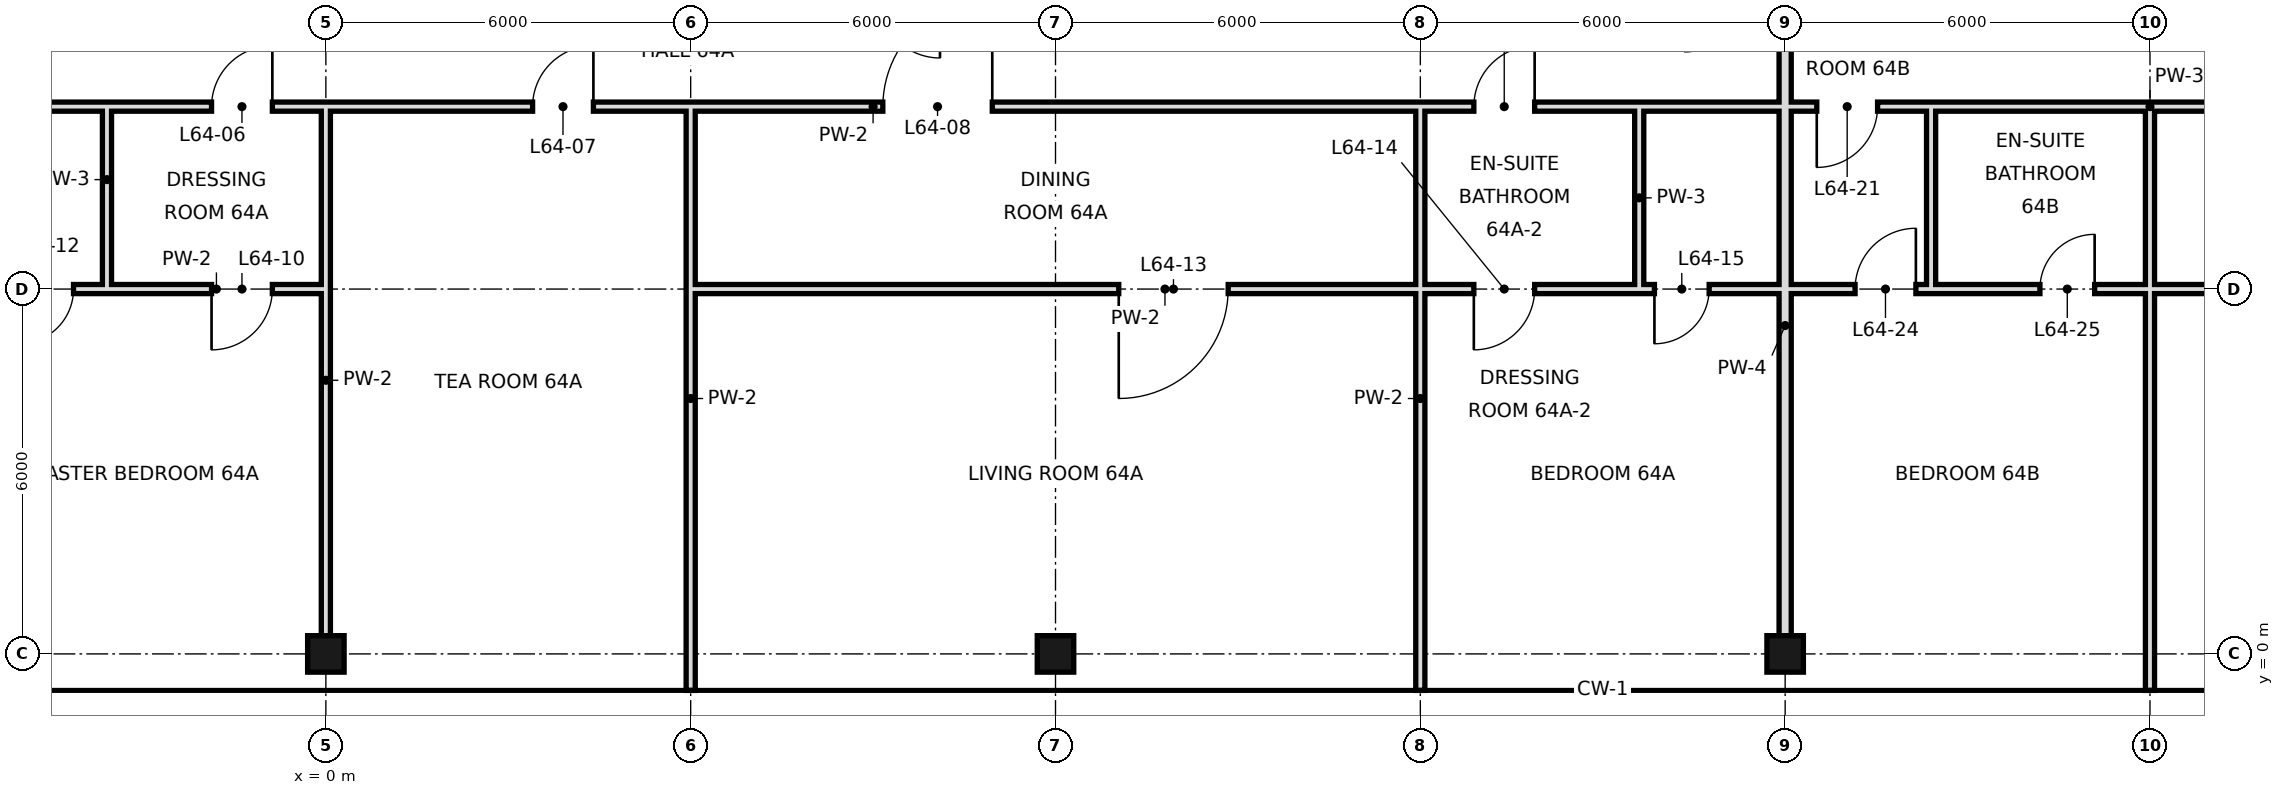
"""IFC4 building model, lengths in metres.
Left out: names, types, materials, properties, quantities, classifications, styles, units other than length and angle.
Written with IfcOpenShell. Run it as: python <this file> out.ifc"""

import sys

from ifc_helpers import new_model, si_unit, direction, frame, frame_2d, origin, origin_2d, place, context, subcontext, project, spatial, rectangle, hollow_rectangle, extrude, element, fill, save


model = new_model("IFC4")
c1 = context("Model", 3, precision=1e-05, world=origin(), true_north=direction((0.0, 1.0)))
c2 = subcontext(c1, "Body", "Model", "MODEL_VIEW")
j1 = project(units=[si_unit("LENGTHUNIT", "METRE"), si_unit("PLANEANGLEUNIT", "RADIAN")], contexts=[c1])
p1 = place(None, origin())
s1 = spatial("IfcSite", under=j1, at=p1, CompositionType="ELEMENT")
p2 = place(p1, origin())
s2 = spatial("IfcBuilding", under=s1, at=p2, CompositionType="ELEMENT")
p3 = place(p2, frame((0.0, 0.0, 270.2)))
s3 = spatial("IfcBuildingStorey", under=s2, at=p3, CompositionType="ELEMENT", Elevation=270.2)
for number, where, z_axis, x_axis in (
    (1, (0.0, 0.0, 0.0), (0.0, 0.0, 1.0), (1.0, 0.0, 0.0)),
    (2, (12.0, 0.0, 0.0), (0.0, 0.0, 1.0), (1.0, 0.0, 0.0)),
    (3, (24.0, 0.0, 0.0), (0.0, 0.0, 1.0), (1.0, 0.0, 0.0)),
):
    element("IfcColumn", number, at=place(p3, frame(where, z_axis=z_axis, x_axis=x_axis)), inside=s3, PredefinedType="COLUMN", context=c2, shape_type="SweptSolid", body=[
        extrude(hollow_rectangle(XDim=0.6, YDim=0.6, WallThickness=0.028, at=origin_2d()), origin(), (0.0, 0.0, 1.0), 3.6),
    ])
p4 = place(p3, frame((-3.6, 6.0, 0.0), z_axis=(0.0, 0.0, 1.0), x_axis=(0.0, 1.0, 0.0)))
e4 = element("IfcWall", 4, at=p4, inside=s3, PredefinedType="PARTITIONING", context=c2, shape_type="SweptSolid", body=[
    extrude(rectangle(XDim=3.0, YDim=0.15, at=frame_2d((1.5, 0.0))), origin(), (0.0, 0.0, 1.0), 3.42),
])
p5 = place(p3, frame((0.0, 0.0, 0.0), z_axis=(0.0, 0.0, 1.0), x_axis=(0.0, 1.0, 0.0)))
e5 = element("IfcWall", 5, at=p5, inside=s3, PredefinedType="PARTITIONING", context=c2, shape_type="SweptSolid", body=[
    extrude(rectangle(XDim=9.0, YDim=0.15, at=frame_2d((4.5, 0.0))), origin(), (0.0, 0.0, 1.0), 2.72),
])
p6 = place(p3, frame((18.0, -0.6, 0.0), z_axis=(0.0, 0.0, 1.0), x_axis=(0.0, 1.0, 0.0)))
e6 = element("IfcWall", 6, at=p6, inside=s3, PredefinedType="PARTITIONING", context=c2, shape_type="SweptSolid", body=[
    extrude(rectangle(XDim=9.6, YDim=0.15, at=frame_2d((4.8, 0.0))), origin(), (0.0, 0.0, 1.0), 2.72),
])
p7 = place(p3, frame((21.6, 6.0, 0.0), z_axis=(0.0, 0.0, 1.0), x_axis=(0.0, 1.0, 0.0)))
e7 = element("IfcWall", 7, at=p7, inside=s3, PredefinedType="PARTITIONING", context=c2, shape_type="SweptSolid", body=[
    extrude(rectangle(XDim=3.0, YDim=0.15, at=frame_2d((1.5, 0.0))), origin(), (0.0, 0.0, 1.0), 3.42),
])
p8 = place(p3, frame((24.0, 0.0, 0.0), z_axis=(0.0, 0.0, 1.0), x_axis=(0.0, 1.0, 0.0)))
e8 = element("IfcWall", 8, at=p8, inside=s3, PredefinedType="SOLIDWALL", context=c2, shape_type="SweptSolid", body=[
    extrude(rectangle(XDim=10.8, YDim=0.2, at=frame_2d((5.4, 0.0))), origin(), (0.0, 0.0, 1.0), 2.72),
])
p9 = place(p3, frame((26.4, 6.0, 0.0), z_axis=(0.0, 0.0, 1.0), x_axis=(0.0, 1.0, 0.0)))
e9 = element("IfcWall", 9, at=p9, inside=s3, PredefinedType="PARTITIONING", context=c2, shape_type="SweptSolid", body=[
    extrude(rectangle(XDim=3.0, YDim=0.15, at=frame_2d((1.5, 0.0))), origin(), (0.0, 0.0, 1.0), 3.42),
])
p10 = place(p3, frame((30.0, -0.6, 0.0), z_axis=(0.0, 0.0, 1.0), x_axis=(0.0, 1.0, 0.0)))
e10 = element("IfcWall", 10, at=p10, inside=s3, PredefinedType="PARTITIONING", context=c2, shape_type="SweptSolid", body=[
    extrude(rectangle(XDim=6.6, YDim=0.15, at=frame_2d((3.3, 0.0))), origin(), (0.0, 0.0, 1.0), 2.72),
])
p11 = place(p3, frame((30.0, 6.0, 0.0), z_axis=(0.0, 0.0, 1.0), x_axis=(0.0, 1.0, 0.0)))
e11 = element("IfcWall", 11, at=p11, inside=s3, PredefinedType="PARTITIONING", context=c2, shape_type="SweptSolid", body=[
    extrude(rectangle(XDim=3.0, YDim=0.15, at=frame_2d((1.5, 0.0))), origin(), (0.0, 0.0, 1.0), 2.72),
])
p12 = place(p3, frame((6.0, -0.6, 0.0), z_axis=(0.0, 0.0, 1.0), x_axis=(0.0, 1.0, 0.0)))
e12 = element("IfcWall", 12, at=p12, inside=s3, PredefinedType="PARTITIONING", context=c2, shape_type="SweptSolid", body=[
    extrude(rectangle(XDim=9.6, YDim=0.15, at=frame_2d((4.8, 0.0))), origin(), (0.0, 0.0, 1.0), 2.72),
])
p13 = place(p3, frame((-3.6, 6.0, 0.0), z_axis=(0.0, 0.0, 1.0), x_axis=(1.0, 0.0, 0.0)))
e13 = element("IfcWall", 13, at=p13, inside=s3, PredefinedType="PARTITIONING", context=c2, shape_type="SweptSolid", body=[
    extrude(rectangle(XDim=3.6, YDim=0.15, at=frame_2d((1.8, 0.0))), origin(), (0.0, 0.0, 1.0), 2.72),
])
p14 = place(p13, frame((1.72, 0.0, 0.0)))
e14 = element("IfcOpeningElement", 14, at=p14, cuts=e13, PredefinedType="OPENING", context=c2, shape_type="SweptSolid", body=[
    extrude(rectangle(XDim=1.0, YDim=2.4, at=frame_2d((0.5, 1.2))), frame((0.0, 0.085, 0.0), z_axis=(0.0, -1.0, 0.0), x_axis=(1.0, 0.0, 0.0)), (0.0, 0.0, 1.0), 0.17),
])
p15 = place(p3, frame((6.0, 6.0, 0.0), z_axis=(0.0, 0.0, 1.0), x_axis=(1.0, 0.0, 0.0)))
e15 = element("IfcWall", 15, at=p15, inside=s3, PredefinedType="PARTITIONING", context=c2, shape_type="SweptSolid", body=[
    extrude(rectangle(XDim=15.6, YDim=0.15, at=frame_2d((7.8, 0.0))), origin(), (0.0, 0.0, 1.0), 2.97),
])
p16 = place(p15, frame((7.04, 0.0, 0.0)))
e16 = element("IfcOpeningElement", 16, at=p16, cuts=e15, PredefinedType="OPENING", context=c2, shape_type="SweptSolid", body=[
    extrude(rectangle(XDim=1.8, YDim=2.4, at=frame_2d((0.9, 1.2))), frame((0.0, 0.085, 0.0), z_axis=(0.0, -1.0, 0.0), x_axis=(1.0, 0.0, 0.0)), (0.0, 0.0, 1.0), 0.17),
])
p17 = place(p15, frame((12.88, 0.0, 0.0)))
e17 = element("IfcOpeningElement", 17, at=p17, cuts=e15, PredefinedType="OPENING", context=c2, shape_type="SweptSolid", body=[
    extrude(rectangle(XDim=1.0, YDim=2.4, at=frame_2d((0.5, 1.2))), frame((0.0, 0.085, 0.0), z_axis=(0.0, -1.0, 0.0), x_axis=(1.0, 0.0, 0.0)), (0.0, 0.0, 1.0), 0.17),
])
p18 = place(p3, frame((24.0, 6.0, 0.0), z_axis=(0.0, 0.0, 1.0), x_axis=(1.0, 0.0, 0.0)))
e18 = element("IfcWall", 18, at=p18, inside=s3, PredefinedType="PARTITIONING", context=c2, shape_type="SweptSolid", body=[
    extrude(rectangle(XDim=2.4, YDim=0.15, at=frame_2d((1.2, 0.0))), origin(), (0.0, 0.0, 1.0), 2.97),
])
p19 = place(p18, frame((1.15, 0.0, 0.0)))
e19 = element("IfcOpeningElement", 19, at=p19, cuts=e18, PredefinedType="OPENING", context=c2, shape_type="SweptSolid", body=[
    extrude(rectangle(XDim=1.0, YDim=2.4, at=frame_2d((0.5, 1.2))), frame((0.0, 0.085, 0.0), z_axis=(0.0, -1.0, 0.0), x_axis=(1.0, 0.0, 0.0)), (0.0, 0.0, 1.0), 0.17),
])
p20 = place(p3, frame((30.0, 6.0, 0.0), z_axis=(0.0, 0.0, 1.0), x_axis=(1.0, 0.0, 0.0)))
e20 = element("IfcWall", 20, at=p20, inside=s3, PredefinedType="PARTITIONING", context=c2, shape_type="SweptSolid", body=[
    extrude(rectangle(XDim=15.6, YDim=0.15, at=frame_2d((7.8, 0.0))), origin(), (0.0, 0.0, 1.0), 2.97),
])
p21 = place(p20, frame((3.16, 0.0, 0.0)))
e21 = element("IfcOpeningElement", 21, at=p21, cuts=e20, PredefinedType="OPENING", context=c2, shape_type="SweptSolid", body=[
    extrude(rectangle(XDim=1.8, YDim=2.4, at=frame_2d((0.9, 1.2))), frame((0.0, 0.085, 0.0), z_axis=(0.0, -1.0, 0.0), x_axis=(1.0, 0.0, 0.0)), (0.0, 0.0, 1.0), 0.17),
])
p22 = place(p20, frame((12.88, 0.0, 0.0)))
e22 = element("IfcOpeningElement", 22, at=p22, cuts=e20, PredefinedType="OPENING", context=c2, shape_type="SweptSolid", body=[
    extrude(rectangle(XDim=1.0, YDim=2.4, at=frame_2d((0.5, 1.2))), frame((0.0, 0.085, 0.0), z_axis=(0.0, -1.0, 0.0), x_axis=(1.0, 0.0, 0.0)), (0.0, 0.0, 1.0), 0.17),
])
p23 = place(p3, frame((-12.0, 6.0, 0.0), z_axis=(0.0, 0.0, 1.0), x_axis=(1.0, 0.0, 0.0)))
e23 = element("IfcWall", 23, at=p23, inside=s3, PredefinedType="PARTITIONING", context=c2, shape_type="SweptSolid", body=[
    extrude(rectangle(XDim=8.4, YDim=0.15, at=frame_2d((4.2, 0.0))), origin(), (0.0, 0.0, 1.0), 2.72),
])
p24 = place(p23, frame((6.95, 0.0, 0.0)))
e24 = element("IfcOpeningElement", 24, at=p24, cuts=e23, PredefinedType="OPENING", context=c2, shape_type="SweptSolid", body=[
    extrude(rectangle(XDim=0.9, YDim=2.4, at=frame_2d((0.45, 1.2))), frame((0.0, 0.085, 0.0), z_axis=(0.0, -1.0, 0.0), x_axis=(1.0, 0.0, 0.0)), (0.0, 0.0, 1.0), 0.17),
])
p25 = place(p3, frame((21.6, 6.0, 0.0), z_axis=(0.0, 0.0, 1.0), x_axis=(1.0, 0.0, 0.0)))
e25 = element("IfcWall", 25, at=p25, inside=s3, PredefinedType="PARTITIONING", context=c2, shape_type="SweptSolid", body=[
    extrude(rectangle(XDim=2.4, YDim=0.15, at=frame_2d((1.2, 0.0))), origin(), (0.0, 0.0, 1.0), 2.97),
])
p26 = place(p25, frame((0.25, 0.0, 0.0)))
e26 = element("IfcOpeningElement", 26, at=p26, cuts=e25, PredefinedType="OPENING", context=c2, shape_type="SweptSolid", body=[
    extrude(rectangle(XDim=0.9, YDim=2.4, at=frame_2d((0.45, 1.2))), frame((0.0, 0.085, 0.0), z_axis=(0.0, -1.0, 0.0), x_axis=(1.0, 0.0, 0.0)), (0.0, 0.0, 1.0), 0.17),
])
p27 = place(p3, frame((26.4, 6.0, 0.0), z_axis=(0.0, 0.0, 1.0), x_axis=(1.0, 0.0, 0.0)))
e27 = element("IfcWall", 27, at=p27, inside=s3, PredefinedType="PARTITIONING", context=c2, shape_type="SweptSolid", body=[
    extrude(rectangle(XDim=3.6, YDim=0.15, at=frame_2d((1.8, 0.0))), origin(), (0.0, 0.0, 1.0), 2.97),
])
p28 = place(p27, frame((1.79, 0.0, 0.0)))
e28 = element("IfcOpeningElement", 28, at=p28, cuts=e27, PredefinedType="OPENING", context=c2, shape_type="SweptSolid", body=[
    extrude(rectangle(XDim=0.9, YDim=2.4, at=frame_2d((0.45, 1.2))), frame((0.0, 0.085, 0.0), z_axis=(0.0, -1.0, 0.0), x_axis=(1.0, 0.0, 0.0)), (0.0, 0.0, 1.0), 0.17),
])
p29 = place(p3, frame((-3.6, 9.0, 0.0), z_axis=(0.0, 0.0, 1.0), x_axis=(1.0, 0.0, 0.0)))
e29 = element("IfcWall", 29, at=p29, inside=s3, PredefinedType="PARTITIONING", context=c2, shape_type="SweptSolid", body=[
    extrude(rectangle(XDim=25.2, YDim=0.15, at=frame_2d((12.6, 0.0))), origin(), (0.0, 0.0, 1.0), 3.42),
])
p30 = place(p29, frame((1.72, 0.0, 0.0)))
e30 = element("IfcOpeningElement", 30, at=p30, cuts=e29, PredefinedType="OPENING", context=c2, shape_type="SweptSolid", body=[
    extrude(rectangle(XDim=1.0, YDim=2.4, at=frame_2d((0.5, 1.2))), frame((0.0, 0.085, 0.0), z_axis=(0.0, -1.0, 0.0), x_axis=(1.0, 0.0, 0.0)), (0.0, 0.0, 1.0), 0.17),
])
p31 = place(p29, frame((7.0, 0.0, 0.0)))
e31 = element("IfcOpeningElement", 31, at=p31, cuts=e29, PredefinedType="OPENING", context=c2, shape_type="SweptSolid", body=[
    extrude(rectangle(XDim=1.0, YDim=2.4, at=frame_2d((0.5, 1.2))), frame((0.0, 0.085, 0.0), z_axis=(0.0, -1.0, 0.0), x_axis=(1.0, 0.0, 0.0)), (0.0, 0.0, 1.0), 0.17),
])
p32 = place(p29, frame((12.76, 0.0, 0.0)))
e32 = element("IfcOpeningElement", 32, at=p32, cuts=e29, PredefinedType="OPENING", context=c2, shape_type="SweptSolid", body=[
    extrude(rectangle(XDim=1.8, YDim=2.4, at=frame_2d((0.9, 1.2))), frame((0.0, 0.085, 0.0), z_axis=(0.0, -1.0, 0.0), x_axis=(1.0, 0.0, 0.0)), (0.0, 0.0, 1.0), 0.17),
])
p33 = place(p29, frame((22.48, 0.0, 0.0)))
e33 = element("IfcOpeningElement", 33, at=p33, cuts=e29, PredefinedType="OPENING", context=c2, shape_type="SweptSolid", body=[
    extrude(rectangle(XDim=1.0, YDim=2.4, at=frame_2d((0.5, 1.2))), frame((0.0, 0.085, 0.0), z_axis=(0.0, -1.0, 0.0), x_axis=(1.0, 0.0, 0.0)), (0.0, 0.0, 1.0), 0.17),
])
p34 = place(p3, frame((24.0, 9.0, 0.0), z_axis=(0.0, 0.0, 1.0), x_axis=(1.0, 0.0, 0.0)))
e34 = element("IfcWall", 34, at=p34, inside=s3, PredefinedType="PARTITIONING", context=c2, shape_type="SweptSolid", body=[
    extrude(rectangle(XDim=2.4, YDim=0.15, at=frame_2d((1.2, 0.0))), origin(), (0.0, 0.0, 1.0), 3.42),
])
p35 = place(p34, frame((0.52, 0.0, 0.0)))
e35 = element("IfcOpeningElement", 35, at=p35, cuts=e34, PredefinedType="OPENING", context=c2, shape_type="SweptSolid", body=[
    extrude(rectangle(XDim=1.0, YDim=2.4, at=frame_2d((0.5, 1.2))), frame((0.0, 0.085, 0.0), z_axis=(0.0, -1.0, 0.0), x_axis=(1.0, 0.0, 0.0)), (0.0, 0.0, 1.0), 0.17),
])
p36 = place(p3, frame((30.0, 9.0, 0.0), z_axis=(0.0, 0.0, 1.0), x_axis=(1.0, 0.0, 0.0)))
e36 = element("IfcWall", 36, at=p36, inside=s3, PredefinedType="PARTITIONING", context=c2, shape_type="SweptSolid", body=[
    extrude(rectangle(XDim=15.6, YDim=0.15, at=frame_2d((7.8, 0.0))), origin(), (0.0, 0.0, 1.0), 3.42),
])
p37 = place(p36, frame((5.1, 0.0, 0.0)))
e37 = element("IfcOpeningElement", 37, at=p37, cuts=e36, PredefinedType="OPENING", context=c2, shape_type="SweptSolid", body=[
    extrude(rectangle(XDim=1.8, YDim=2.4, at=frame_2d((0.9, 1.2))), frame((0.0, 0.085, 0.0), z_axis=(0.0, -1.0, 0.0), x_axis=(1.0, 0.0, 0.0)), (0.0, 0.0, 1.0), 0.17),
])
p38 = place(p36, frame((13.72, 0.0, 0.0)))
e38 = element("IfcOpeningElement", 38, at=p38, cuts=e36, PredefinedType="OPENING", context=c2, shape_type="SweptSolid", body=[
    extrude(rectangle(XDim=1.0, YDim=2.4, at=frame_2d((0.5, 1.2))), frame((0.0, 0.085, 0.0), z_axis=(0.0, -1.0, 0.0), x_axis=(1.0, 0.0, 0.0)), (0.0, 0.0, 1.0), 0.17),
])
p39 = place(p3, frame((-12.6, 9.0, 0.0), z_axis=(0.0, 0.0, 1.0), x_axis=(1.0, 0.0, 0.0)))
e39 = element("IfcWall", 39, at=p39, inside=s3, PredefinedType="PARTITIONING", context=c2, shape_type="SweptSolid", body=[
    extrude(rectangle(XDim=9.0, YDim=0.15, at=frame_2d((4.5, 0.0))), origin(), (0.0, 0.0, 1.0), 3.42),
])
p40 = place(p3, frame((21.6, 9.0, 0.0), z_axis=(0.0, 0.0, 1.0), x_axis=(1.0, 0.0, 0.0)))
e40 = element("IfcWall", 40, at=p40, inside=s3, PredefinedType="PARTITIONING", context=c2, shape_type="SweptSolid", body=[
    extrude(rectangle(XDim=2.4, YDim=0.15, at=frame_2d((1.2, 0.0))), origin(), (0.0, 0.0, 1.0), 3.42),
])
p41 = place(p3, frame((26.4, 9.0, 0.0), z_axis=(0.0, 0.0, 1.0), x_axis=(1.0, 0.0, 0.0)))
e41 = element("IfcWall", 41, at=p41, inside=s3, PredefinedType="PARTITIONING", context=c2, shape_type="SweptSolid", body=[
    extrude(rectangle(XDim=3.6, YDim=0.15, at=frame_2d((1.8, 0.0))), origin(), (0.0, 0.0, 1.0), 3.42),
])
p42 = place(p30, frame((1.0, 0.0, 0.0), z_axis=(0.0, 0.0, 1.0), x_axis=(-1.0, 0.0, 0.0)))
e42 = element("IfcDoor", 42, at=p42, inside=s3, OperationType="SINGLE_SWING_LEFT", PredefinedType="DOOR", context=c2, shape_type="SweptSolid", body=[
    extrude(rectangle(XDim=1.0, YDim=2.4, at=frame_2d((0.5, 1.2))), frame((0.0, 0.025, 0.0), z_axis=(0.0, -1.0, 0.0), x_axis=(1.0, 0.0, 0.0)), (0.0, 0.0, 1.0), 0.05),
])
fill(e30, e42)
p43 = place(p31, frame((1.0, 0.0, 0.0), z_axis=(0.0, 0.0, 1.0), x_axis=(-1.0, 0.0, 0.0)))
e43 = element("IfcDoor", 43, at=p43, inside=s3, OperationType="SINGLE_SWING_LEFT", PredefinedType="DOOR", context=c2, shape_type="SweptSolid", body=[
    extrude(rectangle(XDim=1.0, YDim=2.4, at=frame_2d((0.5, 1.2))), frame((0.0, 0.025, 0.0), z_axis=(0.0, -1.0, 0.0), x_axis=(1.0, 0.0, 0.0)), (0.0, 0.0, 1.0), 0.05),
])
fill(e31, e43)
p44 = place(p32, frame((1.8, 0.0, 0.0), z_axis=(0.0, 0.0, 1.0), x_axis=(-1.0, 0.0, 0.0)))
e44 = element("IfcDoor", 44, at=p44, inside=s3, OperationType="SINGLE_SWING_LEFT", PredefinedType="DOOR", context=c2, shape_type="SweptSolid", body=[
    extrude(rectangle(XDim=1.8, YDim=2.4, at=frame_2d((0.9, 1.2))), frame((0.0, 0.025, 0.0), z_axis=(0.0, -1.0, 0.0), x_axis=(1.0, 0.0, 0.0)), (0.0, 0.0, 1.0), 0.05),
])
fill(e32, e44)
p45 = place(p33, frame((1.0, 0.0, 0.0), z_axis=(0.0, 0.0, 1.0), x_axis=(-1.0, 0.0, 0.0)))
e45 = element("IfcDoor", 45, at=p45, inside=s3, OperationType="SINGLE_SWING_LEFT", PredefinedType="DOOR", context=c2, shape_type="SweptSolid", body=[
    extrude(rectangle(XDim=1.0, YDim=2.4, at=frame_2d((0.5, 1.2))), frame((0.0, 0.025, 0.0), z_axis=(0.0, -1.0, 0.0), x_axis=(1.0, 0.0, 0.0)), (0.0, 0.0, 1.0), 0.05),
])
fill(e33, e45)
p46 = place(p14, frame((1.0, 0.0, 0.0), z_axis=(0.0, 0.0, 1.0), x_axis=(-1.0, 0.0, 0.0)))
e46 = element("IfcDoor", 46, at=p46, inside=s3, OperationType="SINGLE_SWING_RIGHT", PredefinedType="DOOR", context=c2, shape_type="SweptSolid", body=[
    extrude(rectangle(XDim=1.0, YDim=2.4, at=frame_2d((0.5, 1.2))), frame((0.0, 0.025, 0.0), z_axis=(0.0, -1.0, 0.0), x_axis=(1.0, 0.0, 0.0)), (0.0, 0.0, 1.0), 0.05),
])
fill(e14, e46)
p47 = place(p24, frame((0.9, 0.0, 0.0), z_axis=(0.0, 0.0, 1.0), x_axis=(-1.0, 0.0, 0.0)))
e47 = element("IfcDoor", 47, at=p47, inside=s3, OperationType="SINGLE_SWING_RIGHT", PredefinedType="DOOR", context=c2, shape_type="SweptSolid", body=[
    extrude(rectangle(XDim=0.9, YDim=2.4, at=frame_2d((0.45, 1.2))), frame((0.0, 0.025, 0.0), z_axis=(0.0, -1.0, 0.0), x_axis=(1.0, 0.0, 0.0)), (0.0, 0.0, 1.0), 0.05),
])
fill(e24, e47)
p48 = place(p16, frame((1.8, 0.0, 0.0), z_axis=(0.0, 0.0, 1.0), x_axis=(-1.0, 0.0, 0.0)))
e48 = element("IfcDoor", 48, at=p48, inside=s3, OperationType="SINGLE_SWING_RIGHT", PredefinedType="DOOR", context=c2, shape_type="SweptSolid", body=[
    extrude(rectangle(XDim=1.8, YDim=2.4, at=frame_2d((0.9, 1.2))), frame((0.0, 0.025, 0.0), z_axis=(0.0, -1.0, 0.0), x_axis=(1.0, 0.0, 0.0)), (0.0, 0.0, 1.0), 0.05),
])
fill(e16, e48)
p49 = place(p17, frame((1.0, 0.0, 0.0), z_axis=(0.0, 0.0, 1.0), x_axis=(-1.0, 0.0, 0.0)))
e49 = element("IfcDoor", 49, at=p49, inside=s3, OperationType="SINGLE_SWING_RIGHT", PredefinedType="DOOR", context=c2, shape_type="SweptSolid", body=[
    extrude(rectangle(XDim=1.0, YDim=2.4, at=frame_2d((0.5, 1.2))), frame((0.0, 0.025, 0.0), z_axis=(0.0, -1.0, 0.0), x_axis=(1.0, 0.0, 0.0)), (0.0, 0.0, 1.0), 0.05),
])
fill(e17, e49)
p50 = place(p26, frame((0.9, 0.0, 0.0), z_axis=(0.0, 0.0, 1.0), x_axis=(-1.0, 0.0, 0.0)))
e50 = element("IfcDoor", 50, at=p50, inside=s3, OperationType="SINGLE_SWING_RIGHT", PredefinedType="DOOR", context=c2, shape_type="SweptSolid", body=[
    extrude(rectangle(XDim=0.9, YDim=2.4, at=frame_2d((0.45, 1.2))), frame((0.0, 0.025, 0.0), z_axis=(0.0, -1.0, 0.0), x_axis=(1.0, 0.0, 0.0)), (0.0, 0.0, 1.0), 0.05),
])
fill(e26, e50)
p51 = place(p35, frame((1.0, 0.0, 0.0), z_axis=(0.0, 0.0, 1.0), x_axis=(-1.0, 0.0, 0.0)))
e51 = element("IfcDoor", 51, at=p51, inside=s3, OperationType="SINGLE_SWING_RIGHT", PredefinedType="DOOR", context=c2, shape_type="SweptSolid", body=[
    extrude(rectangle(XDim=1.0, YDim=2.4, at=frame_2d((0.5, 1.2))), frame((0.0, 0.025, 0.0), z_axis=(0.0, -1.0, 0.0), x_axis=(1.0, 0.0, 0.0)), (0.0, 0.0, 1.0), 0.05),
])
fill(e35, e51)
p52 = place(p19, frame((1.0, 0.0, 0.0), z_axis=(0.0, 0.0, 1.0), x_axis=(-1.0, 0.0, 0.0)))
e52 = element("IfcDoor", 52, at=p52, inside=s3, OperationType="SINGLE_SWING_LEFT", PredefinedType="DOOR", context=c2, shape_type="SweptSolid", body=[
    extrude(rectangle(XDim=1.0, YDim=2.4, at=frame_2d((0.5, 1.2))), frame((0.0, 0.025, 0.0), z_axis=(0.0, -1.0, 0.0), x_axis=(1.0, 0.0, 0.0)), (0.0, 0.0, 1.0), 0.05),
])
fill(e19, e52)
p53 = place(p28, frame((0.9, 0.0, 0.0), z_axis=(0.0, 0.0, 1.0), x_axis=(-1.0, 0.0, 0.0)))
e53 = element("IfcDoor", 53, at=p53, inside=s3, OperationType="SINGLE_SWING_LEFT", PredefinedType="DOOR", context=c2, shape_type="SweptSolid", body=[
    extrude(rectangle(XDim=0.9, YDim=2.4, at=frame_2d((0.45, 1.2))), frame((0.0, 0.025, 0.0), z_axis=(0.0, -1.0, 0.0), x_axis=(1.0, 0.0, 0.0)), (0.0, 0.0, 1.0), 0.05),
])
fill(e28, e53)
save(model, sys.argv[1])
